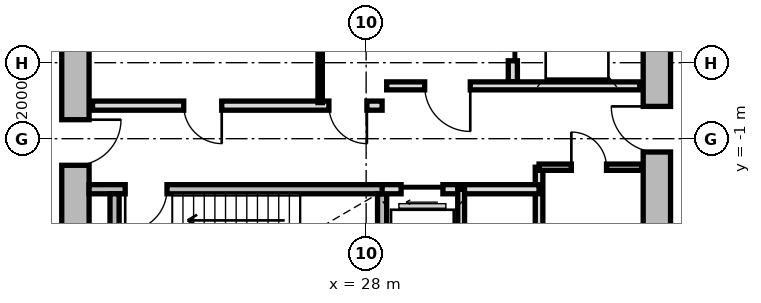
"""IFC4 building model, lengths in metres.
Left out: names, types, materials, properties, quantities, classifications, styles, units other than length and angle.
Written with IfcOpenShell. Run it as: python <this file> out.ifc"""

import sys

from ifc_helpers import new_model, si_unit, direction, frame, frame_2d, origin, place, context, subcontext, project, spatial, rectangle, extrude, source, transform, mapped, element, fill, save


model = new_model("IFC4")
c1 = context("Model", 3, precision=1e-05, world=origin(), true_north=direction((0.0, 1.0)))
c2 = subcontext(c1, "Body", "Model", "MODEL_VIEW")
j1 = project(units=[si_unit("LENGTHUNIT", "METRE"), si_unit("PLANEANGLEUNIT", "RADIAN")], contexts=[c1])
p1 = place(None, origin())
s1 = spatial("IfcSite", under=j1, at=p1, CompositionType="ELEMENT")
p2 = place(p1, origin())
s2 = spatial("IfcBuilding", under=s1, at=p2, CompositionType="ELEMENT")
p3 = place(p2, frame((0.0, 0.0, 129.8)))
s3 = spatial("IfcBuildingStorey", under=s2, at=p3, CompositionType="ELEMENT", Elevation=129.8)
m1 = source(origin(), c2, "Body", "SweptSolid", [
    extrude(rectangle(XDim=11.0, YDim=0.72, at=frame_2d((5.5, 0.0))), origin(), (0.0, 0.0, 1.0), 4.08),
])
p4 = place(p3, frame((20.35, -5.5, 0.0), z_axis=(0.0, 0.0, 1.0), x_axis=(0.0, 1.0, 0.0)))
e1 = element("IfcWall", 1, at=p4, inside=s3, PredefinedType="SHEAR", context=c2, shape_type="MappedRepresentation", body=[
    mapped(m1, transform((0.0, 0.0, 0.0), x_axis=(1.0, 0.0, 0.0), y_axis=(0.0, 1.0, 0.0), z_axis=(0.0, 0.0, 1.0), scale=1.0)),
])
p5 = place(p4, frame((3.8, 0.0, 0.0)))
e2 = element("IfcOpeningElement", 2, at=p5, cuts=e1, PredefinedType="OPENING", context=c2, shape_type="SweptSolid", body=[
    extrude(rectangle(XDim=1.2, YDim=2.15, at=frame_2d((0.6, 1.075))), frame((0.0, 0.37, 0.0), z_axis=(0.0, -1.0, 0.0), x_axis=(1.0, 0.0, 0.0)), (0.0, 0.0, 1.0), 0.74),
])
p6 = place(p3, frame((35.65, 5.5, 0.0), z_axis=(0.0, 0.0, 1.0), x_axis=(0.0, -1.0, 0.0)))
e3 = element("IfcWall", 3, at=p6, inside=s3, PredefinedType="SHEAR", context=c2, shape_type="MappedRepresentation", body=[
    mapped(m1, transform((0.0, 0.0, 0.0), x_axis=(1.0, 0.0, 0.0), y_axis=(0.0, 1.0, 0.0), z_axis=(0.0, 0.0, 1.0), scale=1.0)),
])
p7 = place(p6, frame((5.65, 0.0, 0.0)))
e4 = element("IfcOpeningElement", 4, at=p7, cuts=e3, PredefinedType="OPENING", context=c2, shape_type="SweptSolid", body=[
    extrude(rectangle(XDim=1.2, YDim=2.15, at=frame_2d((0.6, 1.075))), frame((0.0, 0.37, 0.0), z_axis=(0.0, -1.0, 0.0), x_axis=(1.0, 0.0, 0.0)), (0.0, 0.0, 1.0), 0.74),
])
p8 = place(p6, frame((9.3, 0.0, 0.0)))
e5 = element("IfcOpeningElement", 5, at=p8, cuts=e3, PredefinedType="OPENING", context=c2, shape_type="SweptSolid", body=[
    extrude(rectangle(XDim=1.0, YDim=2.1, at=frame_2d((0.5, 1.05))), frame((0.0, 0.37, 0.0), z_axis=(0.0, -1.0, 0.0), x_axis=(1.0, 0.0, 0.0)), (0.0, 0.0, 1.0), 0.74),
])
m2 = source(origin(), c2, "Body", "SweptSolid", [
    extrude(rectangle(XDim=7.83, YDim=0.24, at=frame_2d((3.915, 0.0))), origin(), (0.0, 0.0, 1.0), 4.08),
])
p9 = place(p3, frame((20.71, -2.33, 0.0), z_axis=(0.0, 0.0, 1.0), x_axis=(1.0, 0.0, 0.0)))
e6 = element("IfcWall", 6, at=p9, inside=s3, PredefinedType="PARTITIONING", context=c2, shape_type="MappedRepresentation", body=[
    mapped(m2, transform((0.0, 0.0, 0.0), x_axis=(1.0, 0.0, 0.0), y_axis=(0.0, 1.0, 0.0), z_axis=(0.0, 0.0, 1.0), scale=1.0)),
])
p10 = place(p9, frame((0.95, 0.0, 0.0)))
e7 = element("IfcOpeningElement", 7, at=p10, cuts=e6, PredefinedType="OPENING", context=c2, shape_type="SweptSolid", body=[
    extrude(rectangle(XDim=1.1, YDim=2.15, at=frame_2d((0.55, 1.075))), frame((0.0, 0.13, 0.0), z_axis=(0.0, -1.0, 0.0), x_axis=(1.0, 0.0, 0.0)), (0.0, 0.0, 1.0), 0.26),
])
m3 = source(origin(), c2, "Body", "SweptSolid", [
    extrude(rectangle(XDim=3.14, YDim=0.24, at=frame_2d((1.57, 0.0))), origin(), (0.0, 0.0, 1.0), 4.08),
])
for number, where, z_axis, x_axis in (
    (8, (21.38, -5.59, 0.0), (0.0, 0.0, 1.0), (0.0, 1.0, 0.0)),
    (9, (28.42, -5.59, 0.0), (0.0, 0.0, 1.0), (0.0, 1.0, 0.0)),
):
    element("IfcWall", number, at=place(p3, frame(where, z_axis=z_axis, x_axis=x_axis)), inside=s3, PredefinedType="PARTITIONING", context=c2, shape_type="MappedRepresentation", body=[
        mapped(m3, transform((0.0, 0.0, 0.0), x_axis=(1.0, 0.0, 0.0), y_axis=(0.0, 1.0, 0.0), z_axis=(0.0, 0.0, 1.0), scale=1.0)),
    ])
m4 = source(origin(), c2, "Body", "SweptSolid", [
    extrude(rectangle(XDim=5.0, YDim=0.24, at=frame_2d((2.5, 0.0))), origin(), (0.0, 0.0, 1.0), 4.065),
])
p11 = place(p3, frame((31.86, 0.5, 0.0), z_axis=(0.0, 0.0, 1.0), x_axis=(0.0, 1.0, 0.0)))
e10 = element("IfcWall", 10, at=p11, inside=s3, PredefinedType="PARTITIONING", context=c2, shape_type="MappedRepresentation", body=[
    mapped(m4, transform((0.0, 0.0, 0.0), x_axis=(1.0, 0.0, 0.0), y_axis=(0.0, 1.0, 0.0), z_axis=(0.0, 0.0, 1.0), scale=1.0)),
])
p12 = place(p11, frame((3.05, 0.0, 0.0)))
e11 = element("IfcOpeningElement", 11, at=p12, cuts=e10, PredefinedType="OPENING", context=c2, shape_type="SweptSolid", body=[
    extrude(rectangle(XDim=1.3, YDim=2.2, at=frame_2d((0.65, 1.1))), frame((0.0, 0.13, 0.0), z_axis=(0.0, -1.0, 0.0), x_axis=(1.0, 0.0, 0.0)), (0.0, 0.0, 1.0), 0.26),
])
p13 = place(p11, frame((0.55, 0.0, 0.0)))
e12 = element("IfcOpeningElement", 12, at=p13, cuts=e10, PredefinedType="OPENING", context=c2, shape_type="SweptSolid", body=[
    extrude(rectangle(XDim=1.3, YDim=2.2, at=frame_2d((0.65, 1.1))), frame((0.0, 0.13, 0.0), z_axis=(0.0, -1.0, 0.0), x_axis=(1.0, 0.0, 0.0)), (0.0, 0.0, 1.0), 0.26),
])
m5 = source(origin(), c2, "Body", "SweptSolid", [
    extrude(rectangle(XDim=6.66, YDim=0.21, at=frame_2d((3.33, 0.0))), origin(), (0.0, 0.0, 1.0), 4.065),
])
p14 = place(p3, frame((28.54, 0.39, 0.0), z_axis=(0.0, 0.0, 1.0), x_axis=(1.0, 0.0, 0.0)))
e13 = element("IfcWall", 13, at=p14, inside=s3, PredefinedType="PARTITIONING", context=c2, shape_type="MappedRepresentation", body=[
    mapped(m5, transform((0.0, 0.0, 0.0), x_axis=(1.0, 0.0, 0.0), y_axis=(0.0, 1.0, 0.0), z_axis=(0.0, 0.0, 1.0), scale=1.0)),
])
p15 = place(p14, frame((1.0, 0.0, 0.0)))
e14 = element("IfcOpeningElement", 14, at=p15, cuts=e13, PredefinedType="OPENING", context=c2, shape_type="SweptSolid", body=[
    extrude(rectangle(XDim=1.2, YDim=2.15, at=frame_2d((0.6, 1.075))), frame((0.0, 0.115, 0.0), z_axis=(0.0, -1.0, 0.0), x_axis=(1.0, 0.0, 0.0)), (0.0, 0.0, 1.0), 0.23),
])
m6 = source(origin(), c2, "Body", "SweptSolid", [
    extrude(rectangle(XDim=7.62, YDim=0.24, at=frame_2d((3.81, 0.0))), origin(), (0.0, 0.0, 1.0), 4.065),
])
p16 = place(p3, frame((20.8, -0.13, 0.0), z_axis=(0.0, 0.0, 1.0), x_axis=(1.0, 0.0, 0.0)))
e15 = element("IfcWall", 15, at=p16, inside=s3, PredefinedType="PARTITIONING", context=c2, shape_type="MappedRepresentation", body=[
    mapped(m6, transform((0.0, 0.0, 0.0), x_axis=(1.0, 0.0, 0.0), y_axis=(0.0, 1.0, 0.0), z_axis=(0.0, 0.0, 1.0), scale=1.0)),
])
p17 = place(p16, frame((6.22, 0.0, 0.0)))
e16 = element("IfcOpeningElement", 16, at=p17, cuts=e15, PredefinedType="OPENING", context=c2, shape_type="SweptSolid", body=[
    extrude(rectangle(XDim=1.0, YDim=2.1, at=frame_2d((0.5, 1.05))), frame((0.0, 0.13, 0.0), z_axis=(0.0, -1.0, 0.0), x_axis=(1.0, 0.0, 0.0)), (0.0, 0.0, 1.0), 0.26),
])
p18 = place(p16, frame((2.4, 0.0, 0.0)))
e17 = element("IfcOpeningElement", 17, at=p18, cuts=e15, PredefinedType="OPENING", context=c2, shape_type="SweptSolid", body=[
    extrude(rectangle(XDim=1.0, YDim=2.1, at=frame_2d((0.5, 1.05))), frame((0.0, 0.13, 0.0), z_axis=(0.0, -1.0, 0.0), x_axis=(1.0, 0.0, 0.0)), (0.0, 0.0, 1.0), 0.26),
])
m7 = source(origin(), c2, "Body", "SweptSolid", [
    extrude(rectangle(XDim=2.33, YDim=0.115, at=frame_2d((1.165, 0.0))), origin(), (0.0, 0.0, 1.0), 4.065),
])
p19 = place(p3, frame((26.79, -0.05, 0.0), z_axis=(0.0, 0.0, 1.0), x_axis=(0.0, 1.0, 0.0)))
e18 = element("IfcWall", 18, at=p19, inside=s3, PredefinedType="PARTITIONING", context=c2, shape_type="MappedRepresentation", body=[
    mapped(m7, transform((0.0, 0.0, 0.0), x_axis=(1.0, 0.0, 0.0), y_axis=(0.0, 1.0, 0.0), z_axis=(0.0, 0.0, 1.0), scale=1.0)),
])
m8 = source(origin(), c2, "Body", "SweptSolid", [
    extrude(rectangle(XDim=3.8, YDim=0.2, at=frame_2d((1.9, 0.0))), origin(), (0.0, 0.0, 1.0), 4.065),
])
p20 = place(p3, frame((32.55, -5.55, 0.0), z_axis=(0.0, 0.0, 1.0), x_axis=(0.0, 1.0, 0.0)))
e19 = element("IfcWall", 19, at=p20, inside=s3, PredefinedType="PARTITIONING", context=c2, shape_type="MappedRepresentation", body=[
    mapped(m8, transform((0.0, 0.0, 0.0), x_axis=(1.0, 0.0, 0.0), y_axis=(0.0, 1.0, 0.0), z_axis=(0.0, 0.0, 1.0), scale=1.0)),
])
m9 = source(origin(), c2, "Body", "SweptSolid", [
    extrude(rectangle(XDim=4.13, YDim=0.24, at=frame_2d((2.065, 0.0))), origin(), (0.0, 0.0, 1.0), 4.065),
])
p21 = place(p3, frame((28.42, -2.33, 0.0), z_axis=(0.0, 0.0, 1.0), x_axis=(1.0, 0.0, 0.0)))
e20 = element("IfcWall", 20, at=p21, inside=s3, PredefinedType="PARTITIONING", context=c2, shape_type="MappedRepresentation", body=[
    mapped(m9, transform((0.0, 0.0, 0.0), x_axis=(1.0, 0.0, 0.0), y_axis=(0.0, 1.0, 0.0), z_axis=(0.0, 0.0, 1.0), scale=1.0)),
])
p22 = place(p21, frame((0.5, 0.0, 0.0)))
e21 = element("IfcOpeningElement", 21, at=p22, cuts=e20, PredefinedType="OPENING", context=c2, shape_type="SweptSolid", body=[
    extrude(rectangle(XDim=1.1, YDim=2.2, at=frame_2d((0.55, 1.1))), frame((0.0, 0.13, 0.0), z_axis=(0.0, -1.0, 0.0), x_axis=(1.0, 0.0, 0.0)), (0.0, 0.0, 1.0), 0.26),
])
m10 = source(origin(), c2, "Body", "SweptSolid", [
    extrude(rectangle(XDim=3.22, YDim=0.18, at=frame_2d((1.61, 0.0))), origin(), (0.0, 0.0, 1.0), 4.065),
])
p23 = place(p3, frame((30.5, -5.55, 0.0), z_axis=(0.0, 0.0, 1.0), x_axis=(0.0, 1.0, 0.0)))
e22 = element("IfcWall", 22, at=p23, inside=s3, PredefinedType="PARTITIONING", context=c2, shape_type="MappedRepresentation", body=[
    mapped(m10, transform((0.0, 0.0, 0.0), x_axis=(1.0, 0.0, 0.0), y_axis=(0.0, 1.0, 0.0), z_axis=(0.0, 0.0, 1.0), scale=1.0)),
])
m11 = source(origin(), c2, "Body", "SweptSolid", [
    extrude(rectangle(XDim=2.7, YDim=0.165, at=frame_2d((1.35, 0.0))), origin(), (0.0, 0.0, 1.0), 4.065),
])
p24 = place(p3, frame((32.55, -1.75, 0.0), z_axis=(0.0, 0.0, 1.0), x_axis=(1.0, 0.0, 0.0)))
e23 = element("IfcWall", 23, at=p24, inside=s3, PredefinedType="PARTITIONING", context=c2, shape_type="MappedRepresentation", body=[
    mapped(m11, transform((0.0, 0.0, 0.0), x_axis=(1.0, 0.0, 0.0), y_axis=(0.0, 1.0, 0.0), z_axis=(0.0, 0.0, 1.0), scale=1.0)),
])
p25 = place(p24, frame((0.85, 0.0, 0.0)))
e24 = element("IfcOpeningElement", 24, at=p25, cuts=e23, PredefinedType="OPENING", context=c2, shape_type="SweptSolid", body=[
    extrude(rectangle(XDim=0.925, YDim=2.1, at=frame_2d((0.462, 1.05))), frame((0.0, 0.093, 0.0), z_axis=(0.0, -1.0, 0.0), x_axis=(1.0, 0.0, 0.0)), (0.0, 0.0, 1.0), 0.185),
])
m12 = source(origin(), c2, "Body", "SweptSolid", [
    extrude(rectangle(XDim=1.1, YDim=2.15, at=frame_2d((0.55, 1.075))), frame((0.0, 0.025, 0.0), z_axis=(0.0, -1.0, 0.0), x_axis=(1.0, 0.0, 0.0)), (0.0, 0.0, 1.0), 0.05),
])
p26 = place(p10, frame((1.1, 0.0, 0.0), z_axis=(0.0, 0.0, 1.0), x_axis=(-1.0, 0.0, 0.0)))
e25 = element("IfcDoor", 25, at=p26, inside=s3, OperationType="SINGLE_SWING_RIGHT", PredefinedType="DOOR", context=c2, shape_type="MappedRepresentation", body=[
    mapped(m12, transform((0.0, 0.0, 0.0), x_axis=(1.0, 0.0, 0.0), y_axis=(0.0, 1.0, 0.0), z_axis=(0.0, 0.0, 1.0), scale=1.0)),
])
fill(e7, e25)
m13 = source(origin(), c2, "Body", "SweptSolid", [
    extrude(rectangle(XDim=1.3, YDim=2.2, at=frame_2d((0.65, 1.1))), frame((0.0, 0.025, 0.0), z_axis=(0.0, -1.0, 0.0), x_axis=(1.0, 0.0, 0.0)), (0.0, 0.0, 1.0), 0.05),
])
p27 = place(p13, origin())
e26 = element("IfcDoor", 26, at=p27, inside=s3, OperationType="SLIDING_TO_RIGHT", PredefinedType="DOOR", context=c2, shape_type="MappedRepresentation", body=[
    mapped(m13, transform((0.0, 0.0, 0.0), x_axis=(1.0, 0.0, 0.0), y_axis=(0.0, 1.0, 0.0), z_axis=(0.0, 0.0, 1.0), scale=1.0)),
])
fill(e12, e26)
m14 = source(origin(), c2, "Body", "SweptSolid", [
    extrude(rectangle(XDim=1.2, YDim=2.15, at=frame_2d((0.6, 1.075))), frame((0.0, 0.025, 0.0), z_axis=(0.0, -1.0, 0.0), x_axis=(1.0, 0.0, 0.0)), (0.0, 0.0, 1.0), 0.05),
])
p28 = place(p15, frame((1.2, 0.0, 0.0), z_axis=(0.0, 0.0, 1.0), x_axis=(-1.0, 0.0, 0.0)))
e27 = element("IfcDoor", 27, at=p28, inside=s3, OperationType="SINGLE_SWING_LEFT", PredefinedType="DOOR", context=c2, shape_type="MappedRepresentation", body=[
    mapped(m14, transform((0.0, 0.0, 0.0), x_axis=(1.0, 0.0, 0.0), y_axis=(0.0, 1.0, 0.0), z_axis=(0.0, 0.0, 1.0), scale=1.0)),
])
fill(e14, e27)
p29 = place(p5, frame((1.2, 0.0, 0.0), z_axis=(0.0, 0.0, 1.0), x_axis=(-1.0, 0.0, 0.0)))
e28 = element("IfcDoor", 28, at=p29, inside=s3, OperationType="SINGLE_SWING_LEFT", PredefinedType="DOOR", context=c2, shape_type="MappedRepresentation", body=[
    mapped(m14, transform((0.0, 0.0, 0.0), x_axis=(1.0, 0.0, 0.0), y_axis=(0.0, 1.0, 0.0), z_axis=(0.0, 0.0, 1.0), scale=1.0)),
])
fill(e2, e28)
p30 = place(p7, frame((1.2, 0.0, 0.0), z_axis=(0.0, 0.0, 1.0), x_axis=(-1.0, 0.0, 0.0)))
e29 = element("IfcDoor", 29, at=p30, inside=s3, OperationType="SINGLE_SWING_RIGHT", PredefinedType="DOOR", context=c2, shape_type="MappedRepresentation", body=[
    mapped(m14, transform((0.0, 0.0, 0.0), x_axis=(1.0, 0.0, 0.0), y_axis=(0.0, 1.0, 0.0), z_axis=(0.0, 0.0, 1.0), scale=1.0)),
])
fill(e4, e29)
m15 = source(origin(), c2, "Body", "SweptSolid", [
    extrude(rectangle(XDim=1.0, YDim=2.1, at=frame_2d((0.5, 1.05))), frame((0.0, 0.025, 0.0), z_axis=(0.0, -1.0, 0.0), x_axis=(1.0, 0.0, 0.0)), (0.0, 0.0, 1.0), 0.05),
])
p31 = place(p17, frame((1.0, 0.0, 0.0), z_axis=(0.0, 0.0, 1.0), x_axis=(-1.0, 0.0, 0.0)))
e30 = element("IfcDoor", 30, at=p31, inside=s3, OperationType="SINGLE_SWING_LEFT", PredefinedType="DOOR", context=c2, shape_type="MappedRepresentation", body=[
    mapped(m15, transform((0.0, 0.0, 0.0), x_axis=(1.0, 0.0, 0.0), y_axis=(0.0, 1.0, 0.0), z_axis=(0.0, 0.0, 1.0), scale=1.0)),
])
fill(e16, e30)
p32 = place(p18, frame((1.0, 0.0, 0.0), z_axis=(0.0, 0.0, 1.0), x_axis=(-1.0, 0.0, 0.0)))
e31 = element("IfcDoor", 31, at=p32, inside=s3, OperationType="SINGLE_SWING_LEFT", PredefinedType="DOOR", context=c2, shape_type="MappedRepresentation", body=[
    mapped(m15, transform((0.0, 0.0, 0.0), x_axis=(1.0, 0.0, 0.0), y_axis=(0.0, 1.0, 0.0), z_axis=(0.0, 0.0, 1.0), scale=1.0)),
])
fill(e17, e31)
m16 = source(origin(), c2, "Body", "SweptSolid", [
    extrude(rectangle(XDim=1.1, YDim=2.2, at=frame_2d((0.55, 1.1))), frame((0.0, 0.025, 0.0), z_axis=(0.0, -1.0, 0.0), x_axis=(1.0, 0.0, 0.0)), (0.0, 0.0, 1.0), 0.05),
])
p33 = place(p22, frame((1.1, 0.0, 0.0), z_axis=(0.0, 0.0, 1.0), x_axis=(-1.0, 0.0, 0.0)))
e32 = element("IfcDoor", 32, at=p33, inside=s3, OperationType="SLIDING_TO_LEFT", PredefinedType="DOOR", context=c2, shape_type="MappedRepresentation", body=[
    mapped(m16, transform((0.0, 0.0, 0.0), x_axis=(1.0, 0.0, 0.0), y_axis=(0.0, 1.0, 0.0), z_axis=(0.0, 0.0, 1.0), scale=1.0)),
])
fill(e21, e32)
m17 = source(origin(), c2, "Body", "SweptSolid", [
    extrude(rectangle(XDim=0.925, YDim=2.1, at=frame_2d((0.462, 1.05))), frame((0.0, 0.025, 0.0), z_axis=(0.0, -1.0, 0.0), x_axis=(1.0, 0.0, 0.0)), (0.0, 0.0, 1.0), 0.05),
])
p34 = place(p25, origin())
e33 = element("IfcDoor", 33, at=p34, inside=s3, OperationType="SINGLE_SWING_LEFT", PredefinedType="DOOR", context=c2, shape_type="MappedRepresentation", body=[
    mapped(m17, transform((0.0, 0.0, 0.0), x_axis=(1.0, 0.0, 0.0), y_axis=(0.0, 1.0, 0.0), z_axis=(0.0, 0.0, 1.0), scale=1.0)),
])
fill(e24, e33)
save(model, sys.argv[1])
